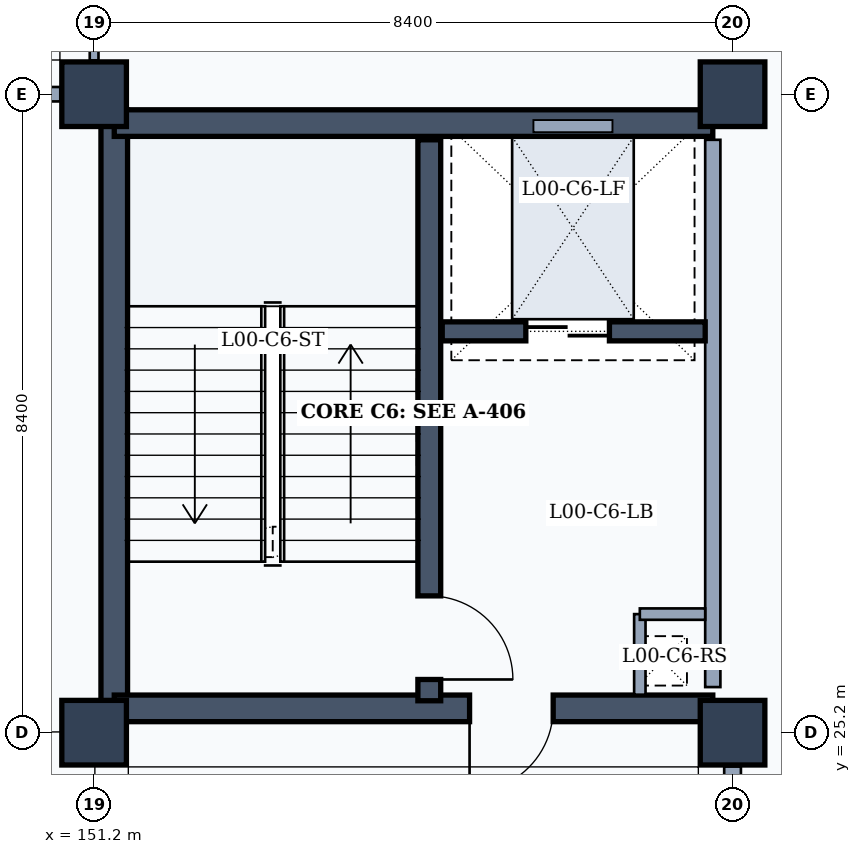
"""IFC4 building model, lengths in metres.
Left out: names, types, materials, properties, quantities, classifications, styles, units other than length and angle.
Written with IfcOpenShell. Run it as: python <this file> out.ifc"""

import sys

from ifc_helpers import new_model, si_unit, direction, frame, frame_2d, origin, origin_2d, place, context, subcontext, project, spatial, rectangle, extrude, element, fill, save


model = new_model("IFC4")
c1 = context("Model", 3, precision=1e-05, world=origin(), true_north=direction((0.0, 1.0)))
c2 = subcontext(c1, "Body", "Model", "MODEL_VIEW")
j1 = project(units=[si_unit("LENGTHUNIT", "METRE"), si_unit("PLANEANGLEUNIT", "RADIAN")], contexts=[c1])
p1 = place(None, origin())
s1 = spatial("IfcSite", under=j1, at=p1, CompositionType="ELEMENT")
p2 = place(p1, origin())
s2 = spatial("IfcBuilding", under=s1, at=p2, CompositionType="ELEMENT")
p3 = place(p2, origin())
s3 = spatial("IfcBuildingStorey", under=s2, at=p3, CompositionType="ELEMENT", Elevation=0.0)
for number, where, z_axis, x_axis in (
    (1, (151.2, 25.2, 0.0), (0.0, 0.0, 1.0), (1.0, 0.0, 0.0)),
    (2, (151.2, 33.6, 0.0), (0.0, 0.0, 1.0), (1.0, 0.0, 0.0)),
    (3, (159.6, 25.2, 0.0), (0.0, 0.0, 1.0), (1.0, 0.0, 0.0)),
    (4, (159.6, 33.6, 0.0), (0.0, 0.0, 1.0), (1.0, 0.0, 0.0)),
):
    element("IfcColumn", number, at=place(p3, frame(where, z_axis=z_axis, x_axis=x_axis)), inside=s3, PredefinedType="COLUMN", context=c2, shape_type="SweptSolid", body=[
        extrude(rectangle(XDim=0.85, YDim=0.85, at=origin_2d()), origin(), (0.0, 0.0, 1.0), 4.8),
    ])
p4 = place(p3, frame((151.465, 25.45, 0.0), z_axis=(0.0, 0.0, 1.0), x_axis=(0.0, 1.0, 0.0)))
e5 = element("IfcWall", 5, at=p4, inside=s3, PredefinedType="SHEAR", context=c2, shape_type="SweptSolid", body=[
    extrude(rectangle(XDim=7.94, YDim=0.35, at=frame_2d((3.97, 0.0))), origin(), (0.0, 0.0, 1.0), 4.55),
])
p5 = place(p3, frame((151.465, 33.22, 0.0), z_axis=(0.0, 0.0, 1.0), x_axis=(1.0, 0.0, 0.0)))
e6 = element("IfcWall", 6, at=p5, inside=s3, PredefinedType="SHEAR", context=c2, shape_type="SweptSolid", body=[
    extrude(rectangle(XDim=7.875, YDim=0.35, at=frame_2d((3.938, 0.0))), origin(), (0.0, 0.0, 1.0), 4.55),
])
p6 = place(p3, frame((159.34, 33.0, 0.0), z_axis=(0.0, 0.0, 1.0), x_axis=(0.0, -1.0, 0.0)))
e7 = element("IfcWall", 7, at=p6, inside=s3, PredefinedType="PARTITIONING", context=c2, shape_type="SweptSolid", body=[
    extrude(rectangle(XDim=7.2, YDim=0.2, at=frame_2d((3.6, 0.0))), origin(), (0.0, 0.0, 1.0), 3.92),
])
p7 = place(p3, frame((159.34, 25.52, 0.0), z_axis=(0.0, 0.0, 1.0), x_axis=(-1.0, 0.0, 0.0)))
e8 = element("IfcWall", 8, at=p7, inside=s3, PredefinedType="SHEAR", context=c2, shape_type="SweptSolid", body=[
    extrude(rectangle(XDim=7.875, YDim=0.35, at=frame_2d((3.938, 0.0))), origin(), (0.0, 0.0, 1.0), 4.55),
])
p8 = place(p7, frame((2.1, 0.0, 0.0)))
e9 = element("IfcOpeningElement", 9, at=p8, cuts=e8, PredefinedType="OPENING", context=c2, shape_type="SweptSolid", body=[
    extrude(rectangle(XDim=1.1, YDim=2.15, at=frame_2d((0.55, 1.075))), frame((0.0, 0.185, 0.0), z_axis=(0.0, -1.0, 0.0), x_axis=(1.0, 0.0, 0.0)), (0.0, 0.0, 1.0), 0.37),
])
p9 = place(p3, frame((155.61, 25.62, 0.0), z_axis=(0.0, 0.0, 1.0), x_axis=(0.0, 1.0, 0.0)))
e10 = element("IfcWall", 10, at=p9, inside=s3, PredefinedType="SHEAR", context=c2, shape_type="SweptSolid", body=[
    extrude(rectangle(XDim=7.38, YDim=0.3, at=frame_2d((3.69, 0.0))), origin(), (0.0, 0.0, 1.0), 4.55),
])
p10 = place(p9, frame((0.28, 0.0, 0.0)))
e11 = element("IfcOpeningElement", 11, at=p10, cuts=e10, PredefinedType="OPENING", context=c2, shape_type="SweptSolid", body=[
    extrude(rectangle(XDim=1.1, YDim=2.15, at=frame_2d((0.55, 1.075))), frame((0.0, 0.16, 0.0), z_axis=(0.0, -1.0, 0.0), x_axis=(1.0, 0.0, 0.0)), (0.0, 0.0, 1.0), 0.32),
])
p11 = place(p3, frame((158.38, 26.76, 0.0), z_axis=(0.0, 0.0, 1.0), x_axis=(0.0, -1.0, 0.0)))
e12 = element("IfcWall", 12, at=p11, inside=s3, PredefinedType="PARTITIONING", context=c2, shape_type="SweptSolid", body=[
    extrude(rectangle(XDim=1.06, YDim=0.15, at=frame_2d((0.53, 0.0))), origin(), (0.0, 0.0, 1.0), 3.92),
])
p12 = place(p3, frame((158.38, 26.76, 0.0), z_axis=(0.0, 0.0, 1.0), x_axis=(1.0, 0.0, 0.0)))
e13 = element("IfcWall", 13, at=p12, inside=s3, PredefinedType="PARTITIONING", context=c2, shape_type="SweptSolid", body=[
    extrude(rectangle(XDim=0.86, YDim=0.15, at=frame_2d((0.43, 0.0))), origin(), (0.0, 0.0, 1.0), 3.92),
])
p13 = place(p3, frame((155.78, 30.48, 0.0), z_axis=(0.0, 0.0, 1.0), x_axis=(1.0, 0.0, 0.0)))
e14 = element("IfcWall", 14, at=p13, inside=s3, PredefinedType="SHEAR", context=c2, shape_type="SweptSolid", body=[
    extrude(rectangle(XDim=3.46, YDim=0.25, at=frame_2d((1.73, 0.0))), origin(), (0.0, 0.0, 1.0), 4.55),
])
p14 = place(p13, frame((1.1, 0.0, 0.0)))
e15 = element("IfcOpeningElement", 15, at=p14, cuts=e14, PredefinedType="OPENING", context=c2, shape_type="SweptSolid", body=[
    extrude(rectangle(XDim=1.1, YDim=2.15, at=frame_2d((0.55, 1.075))), frame((0.0, 0.135, 0.0), z_axis=(0.0, -1.0, 0.0), x_axis=(1.0, 0.0, 0.0)), (0.0, 0.0, 1.0), 0.27),
])
p15 = place(p3, frame((143.12, 33.6, 0.0), z_axis=(0.0, 0.0, 1.0), x_axis=(1.0, 0.0, 0.0)))
e16 = element("IfcWall", 16, at=p15, inside=s3, PredefinedType="PARTITIONING", context=c2, shape_type="SweptSolid", body=[
    extrude(rectangle(XDim=7.635, YDim=0.19, at=frame_2d((3.817, 0.0))), origin(), (0.0, 0.0, 1.0), 3.87),
])
p16 = place(p3, frame((151.2, 34.045, 0.0), z_axis=(0.0, 0.0, 1.0), x_axis=(0.0, 1.0, 0.0)))
e17 = element("IfcWall", 17, at=p16, inside=s3, PredefinedType="PARTITIONING", context=c2, shape_type="SweptSolid", body=[
    extrude(rectangle(XDim=7.635, YDim=0.115, at=frame_2d((3.817, 0.0))), origin(), (0.0, 0.0, 1.0), 3.92),
])
p17 = place(p3, frame((159.6, 17.12, 0.0), z_axis=(0.0, 0.0, 1.0), x_axis=(0.0, 1.0, 0.0)))
e18 = element("IfcWall", 18, at=p17, inside=s3, PredefinedType="PARTITIONING", context=c2, shape_type="SweptSolid", body=[
    extrude(rectangle(XDim=7.635, YDim=0.22, at=frame_2d((3.817, 0.0))), origin(), (0.0, 0.0, 1.0), 3.92),
])
p18 = place(p17, frame((2.85, 0.0, 0.0)))
e19 = element("IfcOpeningElement", 19, at=p18, cuts=e18, PredefinedType="OPENING", context=c2, shape_type="SweptSolid", body=[
    extrude(rectangle(XDim=1.8, YDim=2.3, at=frame_2d((0.9, 1.15))), frame((0.0, 0.12, 0.0), z_axis=(0.0, -1.0, 0.0), x_axis=(1.0, 0.0, 0.0)), (0.0, 0.0, 1.0), 0.24),
])
p19 = place(p8, origin())
e20 = element("IfcDoor", 20, at=p19, inside=s3, OperationType="SINGLE_SWING_RIGHT", PredefinedType="DOOR", context=c2, shape_type="SweptSolid", body=[
    extrude(rectangle(XDim=1.1, YDim=2.15, at=frame_2d((0.55, 1.075))), frame((0.0, 0.025, 0.0), z_axis=(0.0, -1.0, 0.0), x_axis=(1.0, 0.0, 0.0)), (0.0, 0.0, 1.0), 0.05),
])
fill(e9, e20)
p20 = place(p10, frame((1.1, 0.0, 0.0), z_axis=(0.0, 0.0, 1.0), x_axis=(-1.0, 0.0, 0.0)))
e21 = element("IfcDoor", 21, at=p20, inside=s3, OperationType="SINGLE_SWING_RIGHT", PredefinedType="DOOR", context=c2, shape_type="SweptSolid", body=[
    extrude(rectangle(XDim=1.1, YDim=2.15, at=frame_2d((0.55, 1.075))), frame((0.0, 0.025, 0.0), z_axis=(0.0, -1.0, 0.0), x_axis=(1.0, 0.0, 0.0)), (0.0, 0.0, 1.0), 0.05),
])
fill(e11, e21)
p21 = place(p14, origin())
e22 = element("IfcDoor", 22, at=p21, inside=s3, OperationType="DOUBLE_DOOR_SLIDING", PredefinedType="DOOR", context=c2, shape_type="SweptSolid", body=[
    extrude(rectangle(XDim=1.1, YDim=2.15, at=frame_2d((0.55, 1.075))), frame((0.0, 0.025, 0.0), z_axis=(0.0, -1.0, 0.0), x_axis=(1.0, 0.0, 0.0)), (0.0, 0.0, 1.0), 0.05),
])
fill(e15, e22)
save(model, sys.argv[1])
